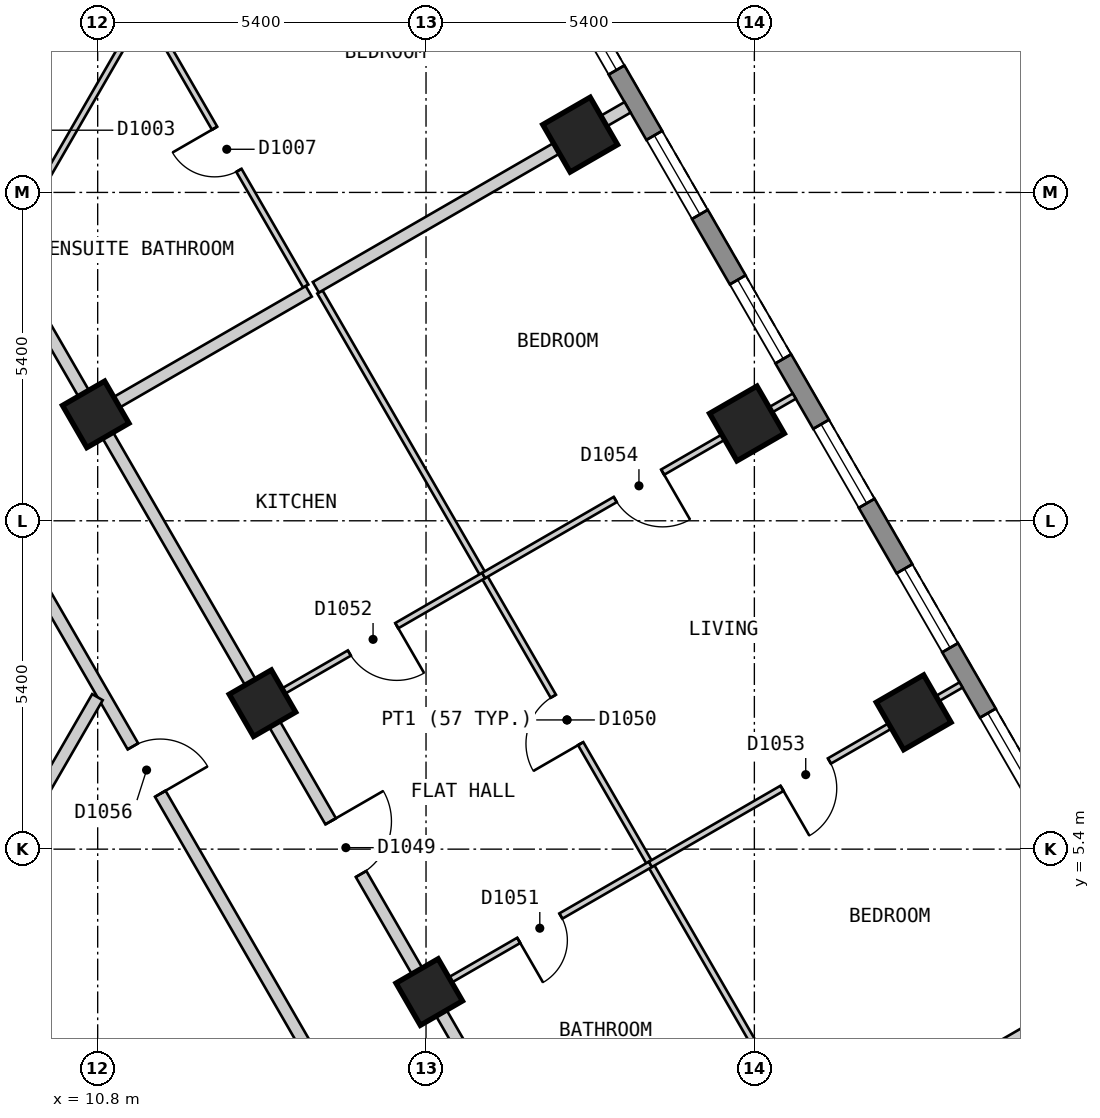
"""IFC4 building model, lengths in metres.
Left out: names, types, materials, properties, quantities, classifications, styles, units other than length and angle.
Written with IfcOpenShell. Run it as: python <this file> out.ifc"""

import sys

from ifc_helpers import new_model, si_unit, direction, frame, frame_2d, origin, origin_2d, place, context, subcontext, project, spatial, polyline, rectangle, outline, extrude, element, fill, save


model = new_model("IFC4")
c1 = context("Model", 3, precision=1e-05, world=origin(), true_north=direction((0.0, 1.0)))
c2 = subcontext(c1, "Body", "Model", "MODEL_VIEW")
j1 = project(units=[si_unit("LENGTHUNIT", "METRE"), si_unit("PLANEANGLEUNIT", "RADIAN")], contexts=[c1])
p1 = place(None, origin())
s1 = spatial("IfcSite", under=j1, at=p1, CompositionType="ELEMENT")
p2 = place(p1, origin())
s2 = spatial("IfcBuilding", under=s1, at=p2, CompositionType="ELEMENT")
p3 = place(p2, frame((0.0, 0.0, 120.6)))
s3 = spatial("IfcBuildingStorey", under=s2, at=p3, CompositionType="ELEMENT", Elevation=120.6)
for number, where, z_axis, x_axis in (
    (1, (24.22, 7.65, 0.0), (0.0, 0.0, 1.0), (-0.5, 0.866, 0.0)),
    (2, (21.478, 12.4, 0.0), (0.0, 0.0, 1.0), (-0.5, 0.866, 0.0)),
    (3, (18.735, 17.15, 0.0), (0.0, 0.0, 1.0), (-0.5, 0.866, 0.0)),
):
    element("IfcColumn", number, at=place(p3, frame(where, z_axis=z_axis, x_axis=x_axis)), inside=s3, PredefinedType="COLUMN", context=c2, shape_type="SweptSolid", body=[
        extrude(rectangle(XDim=0.9, YDim=0.9, at=origin_2d()), origin(), (0.0, 0.0, 1.0), 3.0),
    ])
for number, where, z_axis, x_axis in (
    (4, (16.253, 3.05, 0.0), (0.0, 0.0, 1.0), (-0.5, 0.866, 0.0)),
    (5, (13.51, 7.8, 0.0), (0.0, 0.0, 1.0), (-0.5, 0.866, 0.0)),
    (6, (10.768, 12.55, 0.0), (0.0, 0.0, 1.0), (-0.5, 0.866, 0.0)),
):
    element("IfcColumn", number, at=place(p3, frame(where, z_axis=z_axis, x_axis=x_axis)), inside=s3, PredefinedType="COLUMN", context=c2, shape_type="SweptSolid", body=[
        extrude(rectangle(XDim=0.8, YDim=0.8, at=origin_2d()), origin(), (0.0, 0.0, 1.0), 3.0),
    ])
p4 = place(p3, frame((28.218, 2.825, 0.0), z_axis=(0.0, 0.0, 1.0), x_axis=(-0.500020536353, 0.866013546791, 0.0)))
e7 = element("IfcWall", 7, at=p4, inside=s3, PredefinedType="SOLIDWALL", context=c2, shape_type="SweptSolid", body=[
    extrude(outline(polyline([(0.0, -0.15), (23.325, -0.15), (23.245, 0.15), (0.08, 0.15), (0.0, -0.15)])), origin(), (0.0, 0.0, 1.0), 2.7),
])
p5 = place(p4, frame((1.314, 0.0, 0.15)))
e8 = element("IfcOpeningElement", 8, at=p5, cuts=e7, PredefinedType="OPENING", context=c2, shape_type="SweptSolid", body=[
    extrude(rectangle(XDim=1.5, YDim=2.1, at=frame_2d((0.75, 1.05))), frame((0.0, 0.16, 0.0), z_axis=(0.0, -1.0, 0.0), x_axis=(1.0, 0.0, 0.0)), (0.0, 0.0, 1.0), 0.32),
])
p6 = place(p4, frame((4.056, 0.0, 0.15)))
e9 = element("IfcOpeningElement", 9, at=p6, cuts=e7, PredefinedType="OPENING", context=c2, shape_type="SweptSolid", body=[
    extrude(rectangle(XDim=1.5, YDim=2.1, at=frame_2d((0.75, 1.05))), frame((0.0, 0.16, 0.0), z_axis=(0.0, -1.0, 0.0), x_axis=(1.0, 0.0, 0.0)), (0.0, 0.0, 1.0), 0.32),
])
p7 = place(p4, frame((6.798, 0.0, 0.15)))
e10 = element("IfcOpeningElement", 10, at=p7, cuts=e7, PredefinedType="OPENING", context=c2, shape_type="SweptSolid", body=[
    extrude(rectangle(XDim=1.5, YDim=2.1, at=frame_2d((0.75, 1.05))), frame((0.0, 0.16, 0.0), z_axis=(0.0, -1.0, 0.0), x_axis=(1.0, 0.0, 0.0)), (0.0, 0.0, 1.0), 0.32),
])
p8 = place(p4, frame((9.541, 0.0, 0.15)))
e11 = element("IfcOpeningElement", 11, at=p8, cuts=e7, PredefinedType="OPENING", context=c2, shape_type="SweptSolid", body=[
    extrude(rectangle(XDim=1.5, YDim=2.1, at=frame_2d((0.75, 1.05))), frame((0.0, 0.16, 0.0), z_axis=(0.0, -1.0, 0.0), x_axis=(1.0, 0.0, 0.0)), (0.0, 0.0, 1.0), 0.32),
])
p9 = place(p4, frame((12.284, 0.0, 0.15)))
e12 = element("IfcOpeningElement", 12, at=p9, cuts=e7, PredefinedType="OPENING", context=c2, shape_type="SweptSolid", body=[
    extrude(rectangle(XDim=1.5, YDim=2.1, at=frame_2d((0.75, 1.05))), frame((0.0, 0.16, 0.0), z_axis=(0.0, -1.0, 0.0), x_axis=(1.0, 0.0, 0.0)), (0.0, 0.0, 1.0), 0.32),
])
p10 = place(p4, frame((15.027, 0.0, 0.15)))
e13 = element("IfcOpeningElement", 13, at=p10, cuts=e7, PredefinedType="OPENING", context=c2, shape_type="SweptSolid", body=[
    extrude(rectangle(XDim=1.5, YDim=2.1, at=frame_2d((0.75, 1.05))), frame((0.0, 0.16, 0.0), z_axis=(0.0, -1.0, 0.0), x_axis=(1.0, 0.0, 0.0)), (0.0, 0.0, 1.0), 0.32),
])
p11 = place(p4, frame((17.769, 0.0, 0.15)))
e14 = element("IfcOpeningElement", 14, at=p11, cuts=e7, PredefinedType="OPENING", context=c2, shape_type="SweptSolid", body=[
    extrude(rectangle(XDim=1.5, YDim=2.1, at=frame_2d((0.75, 1.05))), frame((0.0, 0.16, 0.0), z_axis=(0.0, -1.0, 0.0), x_axis=(1.0, 0.0, 0.0)), (0.0, 0.0, 1.0), 0.32),
])
p12 = place(p4, frame((20.511, 0.0, 0.15)))
e15 = element("IfcOpeningElement", 15, at=p12, cuts=e7, PredefinedType="OPENING", context=c2, shape_type="SweptSolid", body=[
    extrude(rectangle(XDim=1.5, YDim=2.1, at=frame_2d((0.75, 1.05))), frame((0.0, 0.16, 0.0), z_axis=(0.0, -1.0, 0.0), x_axis=(1.0, 0.0, 0.0)), (0.0, 0.0, 1.0), 0.32),
])
p13 = place(p3, frame((7.967, 13.0, 0.0), z_axis=(0.0, 0.0, 1.0), x_axis=(0.50003774998, -0.866003607726, 0.0)))
e16 = element("IfcWall", 16, at=p13, inside=s3, PredefinedType="PARTITIONING", context=c2, shape_type="SweptSolid", body=[
    extrude(rectangle(XDim=14.433, YDim=0.2, at=frame_2d((7.217, 0.0))), origin(), (0.0, 0.0, 1.0), 2.7),
])
p14 = place(p13, frame((6.824, 0.0, 0.0)))
e17 = element("IfcOpeningElement", 17, at=p14, cuts=e16, PredefinedType="OPENING", context=c2, shape_type="SweptSolid", body=[
    extrude(rectangle(XDim=0.9, YDim=2.1, at=frame_2d((0.45, 1.05))), frame((0.0, 0.11, 0.0), z_axis=(0.0, -1.0, 0.0), x_axis=(1.0, 0.0, 0.0)), (0.0, 0.0, 1.0), 0.22),
])
p15 = place(p3, frame((9.296, 15.1, 0.0), z_axis=(0.0, 0.0, 1.0), x_axis=(0.499974024244, -0.866040400375, 0.0)))
e18 = element("IfcWall", 18, at=p15, inside=s3, PredefinedType="PARTITIONING", context=c2, shape_type="SweptSolid", body=[
    extrude(rectangle(XDim=16.857, YDim=0.2, at=frame_2d((8.429, 0.0))), origin(), (0.0, 0.0, 1.0), 2.7),
])
p16 = place(p15, frame((10.672, 0.0, 0.0)))
e19 = element("IfcOpeningElement", 19, at=p16, cuts=e18, PredefinedType="OPENING", context=c2, shape_type="SweptSolid", body=[
    extrude(rectangle(XDim=1.0, YDim=2.1, at=frame_2d((0.5, 1.05))), frame((0.0, 0.11, 0.0), z_axis=(0.0, -1.0, 0.0), x_axis=(1.0, 0.0, 0.0)), (0.0, 0.0, 1.0), 0.22),
])
p17 = place(p3, frame((7.028, 1.373, 0.0), z_axis=(0.0, 0.0, 1.0), x_axis=(0.499954271211, 0.866051803703, 0.0)))
e20 = element("IfcWall", 20, at=p17, inside=s3, PredefinedType="PARTITIONING", context=c2, shape_type="SweptSolid", body=[
    extrude(rectangle(XDim=7.536, YDim=0.2, at=frame_2d((3.768, 0.0))), origin(), (0.0, 0.0, 1.0), 2.7),
])
p18 = place(p3, frame((11.603, 19.196, 0.0), z_axis=(0.0, 0.0, 1.0), x_axis=(0.499913406181, -0.866075392977, 0.0)))
e21 = element("IfcWall", 21, at=p18, inside=s3, PredefinedType="PARTITIONING", context=c2, shape_type="SweptSolid", body=[
    extrude(rectangle(XDim=5.239, YDim=0.1, at=frame_2d((2.619, 0.0))), origin(), (0.0, 0.0, 1.0), 2.7),
])
p19 = place(p18, frame((2.24, 0.0, 0.0)))
e22 = element("IfcOpeningElement", 22, at=p19, cuts=e21, PredefinedType="OPENING", context=c2, shape_type="SweptSolid", body=[
    extrude(rectangle(XDim=0.8, YDim=2.1, at=frame_2d((0.4, 1.05))), frame((0.0, 0.06, 0.0), z_axis=(0.0, -1.0, 0.0), x_axis=(1.0, 0.0, 0.0)), (0.0, 0.0, 1.0), 0.12),
])
p20 = place(p3, frame((14.455, 14.563, 0.0), z_axis=(0.0, 0.0, 1.0), x_axis=(0.500009803579, -0.866019743612, 0.0)))
e23 = element("IfcWall", 23, at=p20, inside=s3, PredefinedType="PARTITIONING", context=c2, shape_type="SweptSolid", body=[
    extrude(rectangle(XDim=16.254, YDim=0.1, at=frame_2d((8.127, 0.0))), origin(), (0.0, 0.0, 1.0), 2.7),
])
p21 = place(p20, frame((7.677, 0.0, 0.0)))
e24 = element("IfcOpeningElement", 24, at=p21, cuts=e23, PredefinedType="OPENING", context=c2, shape_type="SweptSolid", body=[
    extrude(rectangle(XDim=0.9, YDim=2.1, at=frame_2d((0.45, 1.05))), frame((0.0, 0.06, 0.0), z_axis=(0.0, -1.0, 0.0), x_axis=(1.0, 0.0, 0.0)), (0.0, 0.0, 1.0), 0.12),
])
p22 = place(p3, frame((9.238, 15.2, 0.0), z_axis=(0.0, 0.0, 1.0), x_axis=(0.499983303743, 0.866035043158, 0.0)))
e25 = element("IfcWall", 25, at=p22, inside=s3, PredefinedType="PARTITIONING", context=c2, shape_type="SweptSolid", body=[
    extrude(rectangle(XDim=4.672, YDim=0.1, at=frame_2d((2.336, 0.0))), origin(), (0.0, 0.0, 1.0), 2.7),
])
p23 = place(p3, frame((8.346, 15.3, 0.0), z_axis=(0.0, 0.0, 1.0), x_axis=(0.415189790387, 0.909734817383, 0.0)))
e26 = element("IfcWall", 26, at=p23, inside=s3, PredefinedType="PARTITIONING", context=c2, shape_type="SweptSolid", body=[
    extrude(rectangle(XDim=4.282, YDim=0.1, at=frame_2d((2.141, 0.0))), origin(), (0.0, 0.0, 1.0), 2.7),
])
p24 = place(p23, frame((1.714, 0.0, 0.0)))
e27 = element("IfcOpeningElement", 27, at=p24, cuts=e26, PredefinedType="OPENING", context=c2, shape_type="SweptSolid", body=[
    extrude(rectangle(XDim=0.8, YDim=2.1, at=frame_2d((0.4, 1.05))), frame((0.0, 0.06, 0.0), z_axis=(0.0, -1.0, 0.0), x_axis=(1.0, 0.0, 0.0)), (0.0, 0.0, 1.0), 0.12),
])
p25 = place(p3, frame((16.339, 3.1, 0.0), z_axis=(0.0, 0.0, 1.0), x_axis=(0.866050731258, 0.499956128963, 0.0)))
e28 = element("IfcWall", 28, at=p25, inside=s3, PredefinedType="PARTITIONING", context=c2, shape_type="SweptSolid", body=[
    extrude(rectangle(XDim=4.1, YDim=0.1, at=frame_2d((2.05, 0.0))), origin(), (0.0, 0.0, 1.0), 2.7),
])
p26 = place(p25, frame((1.6, 0.0, 0.0)))
e29 = element("IfcOpeningElement", 29, at=p26, cuts=e28, PredefinedType="OPENING", context=c2, shape_type="SweptSolid", body=[
    extrude(rectangle(XDim=0.8, YDim=2.1, at=frame_2d((0.4, 1.05))), frame((0.0, 0.06, 0.0), z_axis=(0.0, -1.0, 0.0), x_axis=(1.0, 0.0, 0.0)), (0.0, 0.0, 1.0), 0.12),
])
p27 = place(p3, frame((13.597, 7.85, 0.0), z_axis=(0.0, 0.0, 1.0), x_axis=(0.866006068523, 0.500033488159, 0.0)))
e30 = element("IfcWall", 30, at=p27, inside=s3, PredefinedType="PARTITIONING", context=c2, shape_type="SweptSolid", body=[
    extrude(rectangle(XDim=4.099, YDim=0.1, at=frame_2d((2.05, 0.0))), origin(), (0.0, 0.0, 1.0), 2.7),
])
p28 = place(p27, frame((1.55, 0.0, 0.0)))
e31 = element("IfcOpeningElement", 31, at=p28, cuts=e30, PredefinedType="OPENING", context=c2, shape_type="SweptSolid", body=[
    extrude(rectangle(XDim=0.9, YDim=2.1, at=frame_2d((0.45, 1.05))), frame((0.0, 0.06, 0.0), z_axis=(0.0, -1.0, 0.0), x_axis=(1.0, 0.0, 0.0)), (0.0, 0.0, 1.0), 0.12),
])
p29 = place(p3, frame((22.634, 0.401, 0.0), z_axis=(0.0, 0.0, 1.0), x_axis=(0.86601325737, 0.500021037617, 0.0)))
e32 = element("IfcWall", 32, at=p29, inside=s3, PredefinedType="PARTITIONING", context=c2, shape_type="SweptSolid", body=[
    extrude(rectangle(XDim=5.898, YDim=0.2, at=frame_2d((2.949, 0.0))), origin(), (0.0, 0.0, 1.0), 2.7),
])
p30 = place(p3, frame((10.854, 12.6, 0.0), z_axis=(0.0, 0.0, 1.0), x_axis=(0.866076396086, 0.499911668341, 0.0)))
e33 = element("IfcWall", 33, at=p30, inside=s3, PredefinedType="PARTITIONING", context=c2, shape_type="SweptSolid", body=[
    extrude(rectangle(XDim=3.947, YDim=0.2, at=frame_2d((1.973, 0.0))), origin(), (0.0, 0.0, 1.0), 2.7),
])
p31 = place(p3, frame((14.388, 14.64, 0.0), z_axis=(0.0, 0.0, 1.0), x_axis=(0.866044090212, 0.499967632761, 0.0)))
e34 = element("IfcWall", 34, at=p31, inside=s3, PredefinedType="PARTITIONING", context=c2, shape_type="SweptSolid", body=[
    extrude(rectangle(XDim=5.919, YDim=0.2, at=frame_2d((2.959, 0.0))), origin(), (0.0, 0.0, 1.0), 2.7),
])
p32 = place(p3, frame((19.89, 5.15, 0.0), z_axis=(0.0, 0.0, 1.0), x_axis=(0.865993310977, 0.500055582255, 0.0)))
e35 = element("IfcWall", 35, at=p32, inside=s3, PredefinedType="PARTITIONING", context=c2, shape_type="SweptSolid", body=[
    extrude(rectangle(XDim=5.9, YDim=0.1, at=frame_2d((2.95, 0.0))), origin(), (0.0, 0.0, 1.0), 2.7),
])
p33 = place(p32, frame((2.5, 0.0, 0.0)))
e36 = element("IfcOpeningElement", 36, at=p33, cuts=e35, PredefinedType="OPENING", context=c2, shape_type="SweptSolid", body=[
    extrude(rectangle(XDim=0.9, YDim=2.1, at=frame_2d((0.45, 1.05))), frame((0.0, 0.06, 0.0), z_axis=(0.0, -1.0, 0.0), x_axis=(1.0, 0.0, 0.0)), (0.0, 0.0, 1.0), 0.12),
])
p34 = place(p3, frame((17.147, 9.9, 0.0), z_axis=(0.0, 0.0, 1.0), x_axis=(0.866034692906, 0.499983910424, 0.0)))
e37 = element("IfcWall", 37, at=p34, inside=s3, PredefinedType="PARTITIONING", context=c2, shape_type="SweptSolid", body=[
    extrude(rectangle(XDim=5.901, YDim=0.1, at=frame_2d((2.95, 0.0))), origin(), (0.0, 0.0, 1.0), 2.7),
])
p35 = place(p34, frame((2.5, 0.0, 0.0)))
e38 = element("IfcOpeningElement", 38, at=p35, cuts=e37, PredefinedType="OPENING", context=c2, shape_type="SweptSolid", body=[
    extrude(rectangle(XDim=0.9, YDim=2.1, at=frame_2d((0.45, 1.05))), frame((0.0, 0.06, 0.0), z_axis=(0.0, -1.0, 0.0), x_axis=(1.0, 0.0, 0.0)), (0.0, 0.0, 1.0), 0.12),
])
p36 = place(p6, origin())
e39 = element("IfcWindow", 39, at=p36, inside=s3, PartitioningType="SINGLE_PANEL", PredefinedType="WINDOW", context=c2, shape_type="SweptSolid", body=[
    extrude(rectangle(XDim=1.5, YDim=2.1, at=frame_2d((0.75, 1.05))), frame((0.0, 0.03, 0.0), z_axis=(0.0, -1.0, 0.0), x_axis=(1.0, 0.0, 0.0)), (0.0, 0.0, 1.0), 0.06),
])
fill(e9, e39)
p37 = place(p7, origin())
e40 = element("IfcWindow", 40, at=p37, inside=s3, PartitioningType="SINGLE_PANEL", PredefinedType="WINDOW", context=c2, shape_type="SweptSolid", body=[
    extrude(rectangle(XDim=1.5, YDim=2.1, at=frame_2d((0.75, 1.05))), frame((0.0, 0.03, 0.0), z_axis=(0.0, -1.0, 0.0), x_axis=(1.0, 0.0, 0.0)), (0.0, 0.0, 1.0), 0.06),
])
fill(e10, e40)
p38 = place(p8, origin())
e41 = element("IfcWindow", 41, at=p38, inside=s3, PartitioningType="SINGLE_PANEL", PredefinedType="WINDOW", context=c2, shape_type="SweptSolid", body=[
    extrude(rectangle(XDim=1.5, YDim=2.1, at=frame_2d((0.75, 1.05))), frame((0.0, 0.03, 0.0), z_axis=(0.0, -1.0, 0.0), x_axis=(1.0, 0.0, 0.0)), (0.0, 0.0, 1.0), 0.06),
])
fill(e11, e41)
p39 = place(p9, origin())
e42 = element("IfcWindow", 42, at=p39, inside=s3, PartitioningType="SINGLE_PANEL", PredefinedType="WINDOW", context=c2, shape_type="SweptSolid", body=[
    extrude(rectangle(XDim=1.5, YDim=2.1, at=frame_2d((0.75, 1.05))), frame((0.0, 0.03, 0.0), z_axis=(0.0, -1.0, 0.0), x_axis=(1.0, 0.0, 0.0)), (0.0, 0.0, 1.0), 0.06),
])
fill(e12, e42)
p40 = place(p10, origin())
e43 = element("IfcWindow", 43, at=p40, inside=s3, PartitioningType="SINGLE_PANEL", PredefinedType="WINDOW", context=c2, shape_type="SweptSolid", body=[
    extrude(rectangle(XDim=1.5, YDim=2.1, at=frame_2d((0.75, 1.05))), frame((0.0, 0.03, 0.0), z_axis=(0.0, -1.0, 0.0), x_axis=(1.0, 0.0, 0.0)), (0.0, 0.0, 1.0), 0.06),
])
fill(e13, e43)
p41 = place(p11, origin())
e44 = element("IfcWindow", 44, at=p41, inside=s3, PartitioningType="SINGLE_PANEL", PredefinedType="WINDOW", context=c2, shape_type="SweptSolid", body=[
    extrude(rectangle(XDim=1.5, YDim=2.1, at=frame_2d((0.75, 1.05))), frame((0.0, 0.03, 0.0), z_axis=(0.0, -1.0, 0.0), x_axis=(1.0, 0.0, 0.0)), (0.0, 0.0, 1.0), 0.06),
])
fill(e14, e44)
p42 = place(p19, origin())
e45 = element("IfcDoor", 45, at=p42, inside=s3, OperationType="SINGLE_SWING_LEFT", PredefinedType="DOOR", context=c2, shape_type="SweptSolid", body=[
    extrude(rectangle(XDim=0.8, YDim=2.1, at=frame_2d((0.4, 1.05))), frame((0.0, 0.025, 0.0), z_axis=(0.0, -1.0, 0.0), x_axis=(1.0, 0.0, 0.0)), (0.0, 0.0, 1.0), 0.05),
])
fill(e22, e45)
p43 = place(p16, origin())
e46 = element("IfcDoor", 46, at=p43, inside=s3, OperationType="SINGLE_SWING_LEFT", PredefinedType="DOOR", context=c2, shape_type="SweptSolid", body=[
    extrude(rectangle(XDim=1.0, YDim=2.1, at=frame_2d((0.5, 1.05))), frame((0.0, 0.025, 0.0), z_axis=(0.0, -1.0, 0.0), x_axis=(1.0, 0.0, 0.0)), (0.0, 0.0, 1.0), 0.05),
])
fill(e19, e46)
p44 = place(p21, origin())
e47 = element("IfcDoor", 47, at=p44, inside=s3, OperationType="SINGLE_SWING_RIGHT", PredefinedType="DOOR", context=c2, shape_type="SweptSolid", body=[
    extrude(rectangle(XDim=0.9, YDim=2.1, at=frame_2d((0.45, 1.05))), frame((0.0, 0.025, 0.0), z_axis=(0.0, -1.0, 0.0), x_axis=(1.0, 0.0, 0.0)), (0.0, 0.0, 1.0), 0.05),
])
fill(e24, e47)
p45 = place(p26, origin())
e48 = element("IfcDoor", 48, at=p45, inside=s3, OperationType="SINGLE_SWING_LEFT", PredefinedType="DOOR", context=c2, shape_type="SweptSolid", body=[
    extrude(rectangle(XDim=0.8, YDim=2.1, at=frame_2d((0.4, 1.05))), frame((0.0, 0.025, 0.0), z_axis=(0.0, -1.0, 0.0), x_axis=(1.0, 0.0, 0.0)), (0.0, 0.0, 1.0), 0.05),
])
fill(e29, e48)
p46 = place(p28, origin())
e49 = element("IfcDoor", 49, at=p46, inside=s3, OperationType="SINGLE_SWING_RIGHT", PredefinedType="DOOR", context=c2, shape_type="SweptSolid", body=[
    extrude(rectangle(XDim=0.9, YDim=2.1, at=frame_2d((0.45, 1.05))), frame((0.0, 0.025, 0.0), z_axis=(0.0, -1.0, 0.0), x_axis=(1.0, 0.0, 0.0)), (0.0, 0.0, 1.0), 0.05),
])
fill(e31, e49)
p47 = place(p33, origin())
e50 = element("IfcDoor", 50, at=p47, inside=s3, OperationType="SINGLE_SWING_LEFT", PredefinedType="DOOR", context=c2, shape_type="SweptSolid", body=[
    extrude(rectangle(XDim=0.9, YDim=2.1, at=frame_2d((0.45, 1.05))), frame((0.0, 0.025, 0.0), z_axis=(0.0, -1.0, 0.0), x_axis=(1.0, 0.0, 0.0)), (0.0, 0.0, 1.0), 0.05),
])
fill(e36, e50)
p48 = place(p35, origin())
e51 = element("IfcDoor", 51, at=p48, inside=s3, OperationType="SINGLE_SWING_RIGHT", PredefinedType="DOOR", context=c2, shape_type="SweptSolid", body=[
    extrude(rectangle(XDim=0.9, YDim=2.1, at=frame_2d((0.45, 1.05))), frame((0.0, 0.025, 0.0), z_axis=(0.0, -1.0, 0.0), x_axis=(1.0, 0.0, 0.0)), (0.0, 0.0, 1.0), 0.05),
])
fill(e38, e51)
p49 = place(p14, origin())
e52 = element("IfcDoor", 52, at=p49, inside=s3, OperationType="SINGLE_SWING_RIGHT", PredefinedType="DOOR", context=c2, shape_type="SweptSolid", body=[
    extrude(rectangle(XDim=0.9, YDim=2.1, at=frame_2d((0.45, 1.05))), frame((0.0, 0.025, 0.0), z_axis=(0.0, -1.0, 0.0), x_axis=(1.0, 0.0, 0.0)), (0.0, 0.0, 1.0), 0.05),
])
fill(e17, e52)
save(model, sys.argv[1])
